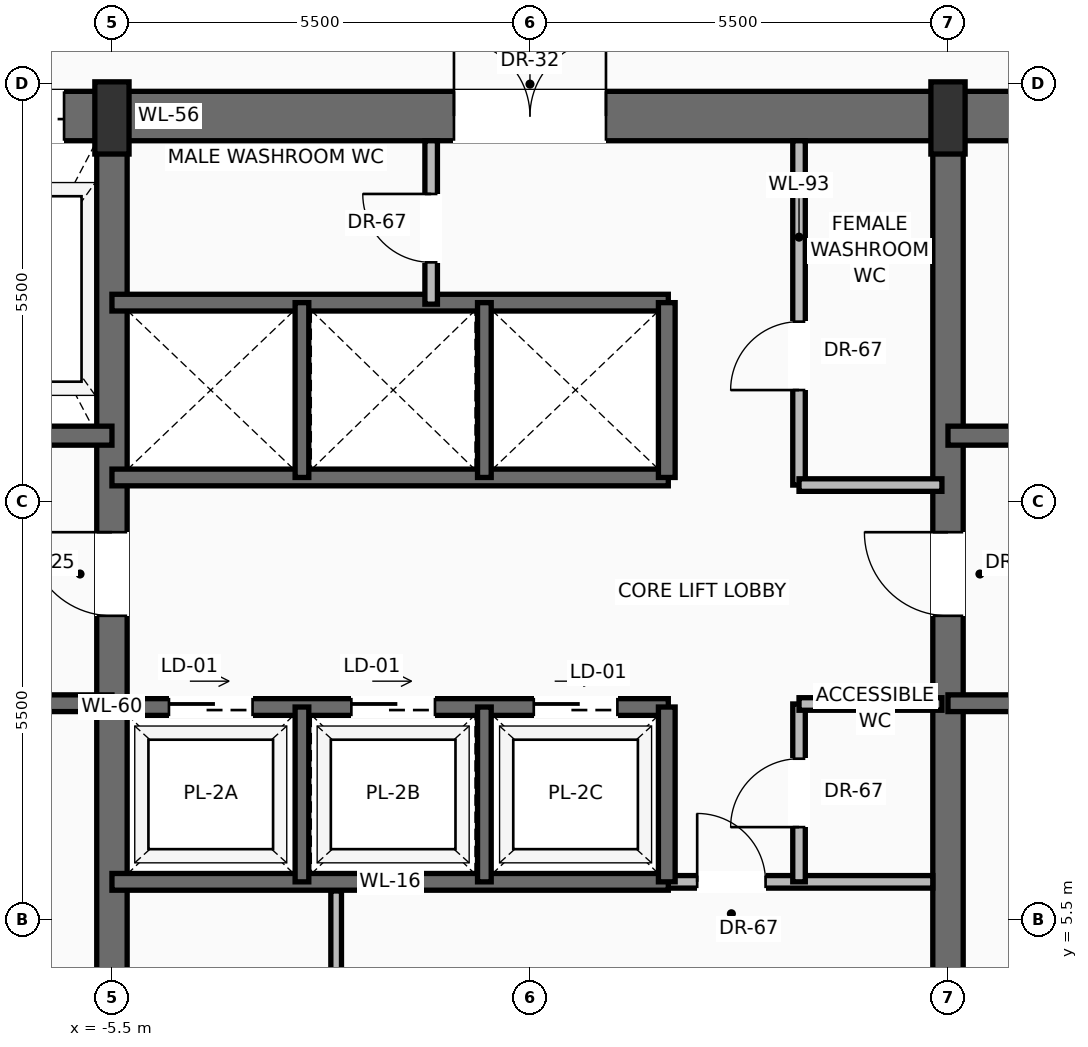
"""IFC4 building model, lengths in metres.
Left out: names, types, materials, properties, quantities, classifications, styles, units other than length and angle.
Written with IfcOpenShell. Run it as: python <this file> out.ifc"""

import sys

from ifc_helpers import new_model, si_unit, direction, frame, frame_2d, origin, origin_2d, place, context, subcontext, project, spatial, rectangle, extrude, source, transform, mapped, element, fill, save


model = new_model("IFC4")
c1 = context("Model", 3, precision=1e-05, world=origin(), true_north=direction((0.0, 1.0)))
c2 = subcontext(c1, "Body", "Model", "MODEL_VIEW")
j1 = project(units=[si_unit("LENGTHUNIT", "METRE"), si_unit("PLANEANGLEUNIT", "RADIAN")], contexts=[c1])
p1 = place(None, origin())
s1 = spatial("IfcSite", under=j1, at=p1, CompositionType="ELEMENT")
p2 = place(p1, origin())
s2 = spatial("IfcBuilding", under=s1, at=p2, CompositionType="ELEMENT")
p3 = place(p2, frame((0.0, 0.0, 174.7)))
s3 = spatial("IfcBuildingStorey", under=s2, at=p3, CompositionType="ELEMENT", Elevation=174.7)
p4 = place(p3, frame((-10.8, 16.075, 0.0), z_axis=(0.0, 0.0, 1.0), x_axis=(1.0, 0.0, 0.0)))
e1 = element("IfcWall", 1, at=p4, inside=s3, PredefinedType="SHEAR", context=c2, shape_type="SweptSolid", body=[
    extrude(rectangle(XDim=21.6, YDim=0.65, at=frame_2d((10.8, 0.0))), origin(), (0.0, 0.0, 1.0), 3.47),
])
p5 = place(p4, frame((3.37, 0.0, 0.0)))
e2 = element("IfcOpeningElement", 2, at=p5, cuts=e1, PredefinedType="OPENING", context=c2, shape_type="SweptSolid", body=[
    extrude(rectangle(XDim=1.3, YDim=2.3, at=frame_2d((0.65, 1.15))), frame((0.0, 0.335, 0.0), z_axis=(0.0, -1.0, 0.0), x_axis=(1.0, 0.0, 0.0)), (0.0, 0.0, 1.0), 0.67),
])
p6 = place(p4, frame((9.8, 0.0, 0.0)))
e3 = element("IfcOpeningElement", 3, at=p6, cuts=e1, PredefinedType="OPENING", context=c2, shape_type="SweptSolid", body=[
    extrude(rectangle(XDim=2.0, YDim=2.4, at=frame_2d((1.0, 1.2))), frame((0.0, 0.335, 0.0), z_axis=(0.0, -1.0, 0.0), x_axis=(1.0, 0.0, 0.0)), (0.0, 0.0, 1.0), 0.67),
])
p7 = place(p3, frame((-5.5, 0.525, 0.0), z_axis=(0.0, 0.0, 1.0), x_axis=(0.0, 1.0, 0.0)))
e4 = element("IfcWall", 4, at=p7, inside=s3, PredefinedType="SHEAR", context=c2, shape_type="SweptSolid", body=[
    extrude(rectangle(XDim=15.55, YDim=0.4, at=frame_2d((7.775, 0.0))), origin(), (0.0, 0.0, 1.0), 3.47),
])
p8 = place(p7, frame((8.975, 0.0, 0.0)))
e5 = element("IfcOpeningElement", 5, at=p8, cuts=e4, PredefinedType="OPENING", context=c2, shape_type="SweptSolid", body=[
    extrude(rectangle(XDim=1.1, YDim=2.2, at=frame_2d((0.55, 1.1))), frame((0.0, 0.21, 0.0), z_axis=(0.0, -1.0, 0.0), x_axis=(1.0, 0.0, 0.0)), (0.0, 0.0, 1.0), 0.42),
])
p9 = place(p3, frame((5.5, 0.525, 0.0), z_axis=(0.0, 0.0, 1.0), x_axis=(0.0, 1.0, 0.0)))
e6 = element("IfcWall", 6, at=p9, inside=s3, PredefinedType="SHEAR", context=c2, shape_type="SweptSolid", body=[
    extrude(rectangle(XDim=15.55, YDim=0.4, at=frame_2d((7.775, 0.0))), origin(), (0.0, 0.0, 1.0), 3.47),
])
p10 = place(p9, frame((8.975, 0.0, 0.0)))
e7 = element("IfcOpeningElement", 7, at=p10, cuts=e6, PredefinedType="OPENING", context=c2, shape_type="SweptSolid", body=[
    extrude(rectangle(XDim=1.1, YDim=2.2, at=frame_2d((0.55, 1.1))), frame((0.0, 0.21, 0.0), z_axis=(0.0, -1.0, 0.0), x_axis=(1.0, 0.0, 0.0)), (0.0, 0.0, 1.0), 0.42),
])
m1 = source(origin(), c2, "Body", "SweptSolid", [
    extrude(rectangle(XDim=0.45, YDim=0.95, at=origin_2d()), origin(), (0.0, 0.0, 1.0), 3.7),
])
for number, where, z_axis, x_axis in (
    (8, (-5.5, 16.05, 0.0), (0.0, 0.0, 1.0), (1.0, 0.0, 0.0)),
    (9, (5.5, 16.05, 0.0), (0.0, 0.0, 1.0), (1.0, 0.0, 0.0)),
):
    element("IfcColumn", number, at=place(p3, frame(where, z_axis=z_axis, x_axis=x_axis)), inside=s3, PredefinedType="PILASTER", context=c2, shape_type="MappedRepresentation", body=[
        mapped(m1, transform((0.0, 0.0, 0.0), scale=1.0)),
    ])
p11 = place(p3, frame((-5.5, 8.35, 0.0), z_axis=(0.0, 0.0, 1.0), x_axis=(-1.0, 0.0, 0.0)))
e10 = element("IfcWall", 10, at=p11, inside=s3, PredefinedType="SOLIDWALL", context=c2, shape_type="SweptSolid", body=[
    extrude(rectangle(XDim=4.65, YDim=0.22, at=frame_2d((2.325, 0.0))), origin(), (0.0, 0.0, 1.0), 3.47),
])
p12 = place(p11, frame((2.5, 0.0, 0.0)))
e11 = element("IfcOpeningElement", 11, at=p12, cuts=e10, PredefinedType="OPENING", context=c2, shape_type="SweptSolid", body=[
    extrude(rectangle(XDim=1.15, YDim=2.2, at=frame_2d((0.575, 1.1))), frame((0.0, 0.12, 0.0), z_axis=(0.0, -1.0, 0.0), x_axis=(1.0, 0.0, 0.0)), (0.0, 0.0, 1.0), 0.24),
])
p13 = place(p3, frame((-5.5, 11.87, 0.0), z_axis=(0.0, 0.0, 1.0), x_axis=(-1.0, 0.0, 0.0)))
e12 = element("IfcWall", 12, at=p13, inside=s3, PredefinedType="SOLIDWALL", context=c2, shape_type="SweptSolid", body=[
    extrude(rectangle(XDim=4.65, YDim=0.25, at=frame_2d((2.325, 0.0))), origin(), (0.0, 0.0, 1.0), 3.47),
])
p14 = place(p13, frame((2.95, 0.0, 0.0)))
e13 = element("IfcOpeningElement", 13, at=p14, cuts=e12, PredefinedType="OPENING", context=c2, shape_type="SweptSolid", body=[
    extrude(rectangle(XDim=1.2, YDim=2.25, at=frame_2d((0.6, 1.125))), frame((0.0, 0.135, 0.0), z_axis=(0.0, -1.0, 0.0), x_axis=(1.0, 0.0, 0.0)), (0.0, 0.0, 1.0), 0.27),
])
p15 = place(p3, frame((10.15, 8.35, 0.0), z_axis=(0.0, 0.0, 1.0), x_axis=(-1.0, 0.0, 0.0)))
e14 = element("IfcWall", 14, at=p15, inside=s3, PredefinedType="SOLIDWALL", context=c2, shape_type="SweptSolid", body=[
    extrude(rectangle(XDim=4.65, YDim=0.22, at=frame_2d((2.325, 0.0))), origin(), (0.0, 0.0, 1.0), 3.47),
])
p16 = place(p15, frame((1.0, 0.0, 0.0)))
e15 = element("IfcOpeningElement", 15, at=p16, cuts=e14, PredefinedType="OPENING", context=c2, shape_type="SweptSolid", body=[
    extrude(rectangle(XDim=1.15, YDim=2.2, at=frame_2d((0.575, 1.1))), frame((0.0, 0.12, 0.0), z_axis=(0.0, -1.0, 0.0), x_axis=(1.0, 0.0, 0.0)), (0.0, 0.0, 1.0), 0.24),
])
p17 = place(p3, frame((10.15, 11.87, 0.0), z_axis=(0.0, 0.0, 1.0), x_axis=(-1.0, 0.0, 0.0)))
e16 = element("IfcWall", 16, at=p17, inside=s3, PredefinedType="SOLIDWALL", context=c2, shape_type="SweptSolid", body=[
    extrude(rectangle(XDim=4.65, YDim=0.25, at=frame_2d((2.325, 0.0))), origin(), (0.0, 0.0, 1.0), 3.47),
])
p18 = place(p17, frame((0.5, 0.0, 0.0)))
e17 = element("IfcOpeningElement", 17, at=p18, cuts=e16, PredefinedType="OPENING", context=c2, shape_type="SweptSolid", body=[
    extrude(rectangle(XDim=1.2, YDim=2.25, at=frame_2d((0.6, 1.125))), frame((0.0, 0.135, 0.0), z_axis=(0.0, -1.0, 0.0), x_axis=(1.0, 0.0, 0.0)), (0.0, 0.0, 1.0), 0.27),
])
p19 = place(p3, frame((1.82, 6.0, 0.0), z_axis=(0.0, 0.0, 1.0), x_axis=(1.0, 0.0, 0.0)))
e18 = element("IfcWall", 18, at=p19, inside=s3, PredefinedType="PARTITIONING", context=c2, shape_type="SweptSolid", body=[
    extrude(rectangle(XDim=3.48, YDim=0.165, at=frame_2d((1.74, 0.0))), origin(), (0.0, 0.0, 1.0), 3.462),
])
p20 = place(p19, frame((0.38, 0.0, 0.0)))
e19 = element("IfcOpeningElement", 19, at=p20, cuts=e18, PredefinedType="OPENING", context=c2, shape_type="SweptSolid", body=[
    extrude(rectangle(XDim=0.9, YDim=2.1, at=frame_2d((0.45, 1.05))), frame((0.0, 0.093, 0.0), z_axis=(0.0, -1.0, 0.0), x_axis=(1.0, 0.0, 0.0)), (0.0, 0.0, 1.0), 0.185),
])
p21 = place(p3, frame((-2.55, 0.85, 0.0), z_axis=(0.0, 0.0, 1.0), x_axis=(0.0, 1.0, 0.0)))
e20 = element("IfcWall", 20, at=p21, inside=s3, PredefinedType="PARTITIONING", context=c2, shape_type="SweptSolid", body=[
    extrude(rectangle(XDim=5.03, YDim=0.14, at=frame_2d((2.515, 0.0))), origin(), (0.0, 0.0, 1.0), 3.462),
])
p22 = place(p21, frame((2.1, 0.0, 0.0)))
e21 = element("IfcOpeningElement", 21, at=p22, cuts=e20, PredefinedType="OPENING", context=c2, shape_type="SweptSolid", body=[
    extrude(rectangle(XDim=0.9, YDim=2.1, at=frame_2d((0.45, 1.05))), frame((0.0, 0.08, 0.0), z_axis=(0.0, -1.0, 0.0), x_axis=(1.0, 0.0, 0.0)), (0.0, 0.0, 1.0), 0.16),
])
p23 = place(p3, frame((3.54, 6.0, 0.0), z_axis=(0.0, 0.0, 1.0), x_axis=(0.0, 1.0, 0.0)))
e22 = element("IfcWall", 22, at=p23, inside=s3, PredefinedType="PARTITIONING", context=c2, shape_type="SweptSolid", body=[
    extrude(rectangle(XDim=2.34, YDim=0.165, at=frame_2d((1.17, 0.0))), origin(), (0.0, 0.0, 1.0), 3.462),
])
p24 = place(p23, frame((0.72, 0.0, 0.0)))
e23 = element("IfcOpeningElement", 23, at=p24, cuts=e22, PredefinedType="OPENING", context=c2, shape_type="SweptSolid", body=[
    extrude(rectangle(XDim=0.9, YDim=2.1, at=frame_2d((0.45, 1.05))), frame((0.0, 0.093, 0.0), z_axis=(0.0, -1.0, 0.0), x_axis=(1.0, 0.0, 0.0)), (0.0, 0.0, 1.0), 0.185),
])
p25 = place(p3, frame((3.54, 8.34, 0.0), z_axis=(0.0, 0.0, 1.0), x_axis=(1.0, 0.0, 0.0)))
e24 = element("IfcWall", 24, at=p25, inside=s3, PredefinedType="PARTITIONING", context=c2, shape_type="SweptSolid", body=[
    extrude(rectangle(XDim=1.88, YDim=0.165, at=frame_2d((0.94, 0.0))), origin(), (0.0, 0.0, 1.0), 3.462),
])
p26 = place(p3, frame((-5.5, 6.0, 0.0), z_axis=(0.0, 0.0, 1.0), x_axis=(1.0, 0.0, 0.0)))
e25 = element("IfcWall", 25, at=p26, inside=s3, PredefinedType="SOLIDWALL", context=c2, shape_type="SweptSolid", body=[
    extrude(rectangle(XDim=7.32, YDim=0.22, at=frame_2d((3.66, 0.0))), origin(), (0.0, 0.0, 1.0), 3.47),
])
p27 = place(p3, frame((-5.5, 8.3, 0.0), z_axis=(0.0, 0.0, 1.0), x_axis=(1.0, 0.0, 0.0)))
e26 = element("IfcWall", 26, at=p27, inside=s3, PredefinedType="SOLIDWALL", context=c2, shape_type="SweptSolid", body=[
    extrude(rectangle(XDim=7.32, YDim=0.22, at=frame_2d((3.66, 0.0))), origin(), (0.0, 0.0, 1.0), 3.47),
])
p28 = place(p27, frame((0.75, 0.0, 0.0)))
e27 = element("IfcOpeningElement", 27, at=p28, cuts=e26, PredefinedType="OPENING", context=c2, shape_type="SweptSolid", body=[
    extrude(rectangle(XDim=1.1, YDim=2.2, at=frame_2d((0.55, 1.1))), frame((0.0, 0.12, 0.0), z_axis=(0.0, -1.0, 0.0), x_axis=(1.0, 0.0, 0.0)), (0.0, 0.0, 1.0), 0.24),
])
p29 = place(p27, frame((3.15, 0.0, 0.0)))
e28 = element("IfcOpeningElement", 28, at=p29, cuts=e26, PredefinedType="OPENING", context=c2, shape_type="SweptSolid", body=[
    extrude(rectangle(XDim=1.1, YDim=2.2, at=frame_2d((0.55, 1.1))), frame((0.0, 0.12, 0.0), z_axis=(0.0, -1.0, 0.0), x_axis=(1.0, 0.0, 0.0)), (0.0, 0.0, 1.0), 0.24),
])
p30 = place(p27, frame((5.55, 0.0, 0.0)))
e29 = element("IfcOpeningElement", 29, at=p30, cuts=e26, PredefinedType="OPENING", context=c2, shape_type="SweptSolid", body=[
    extrude(rectangle(XDim=1.1, YDim=2.2, at=frame_2d((0.55, 1.1))), frame((0.0, 0.12, 0.0), z_axis=(0.0, -1.0, 0.0), x_axis=(1.0, 0.0, 0.0)), (0.0, 0.0, 1.0), 0.24),
])
p31 = place(p3, frame((1.8, 6.0, 0.0), z_axis=(0.0, 0.0, 1.0), x_axis=(0.0, 1.0, 0.0)))
e30 = element("IfcWall", 30, at=p31, inside=s3, PredefinedType="SOLIDWALL", context=c2, shape_type="SweptSolid", body=[
    extrude(rectangle(XDim=2.3, YDim=0.22, at=frame_2d((1.15, 0.0))), origin(), (0.0, 0.0, 1.0), 3.47),
])
for number, where, z_axis, x_axis in (
    (31, (-3.0, 6.0, 0.0), (0.0, 0.0, 1.0), (0.0, 1.0, 0.0)),
    (32, (-0.6, 6.0, 0.0), (0.0, 0.0, 1.0), (0.0, 1.0, 0.0)),
):
    element("IfcWall", number, at=place(p3, frame(where, z_axis=z_axis, x_axis=x_axis)), inside=s3, PredefinedType="SOLIDWALL", context=c2, shape_type="SweptSolid", body=[
        extrude(rectangle(XDim=2.3, YDim=0.18, at=frame_2d((1.15, 0.0))), origin(), (0.0, 0.0, 1.0), 3.47),
    ])
for number, where, z_axis, x_axis in (
    (33, (-5.5, 11.32, 0.0), (0.0, 0.0, 1.0), (1.0, 0.0, 0.0)),
    (34, (-5.5, 13.62, 0.0), (0.0, 0.0, 1.0), (1.0, 0.0, 0.0)),
):
    element("IfcWall", number, at=place(p3, frame(where, z_axis=z_axis, x_axis=x_axis)), inside=s3, PredefinedType="SOLIDWALL", context=c2, shape_type="SweptSolid", body=[
        extrude(rectangle(XDim=7.32, YDim=0.22, at=frame_2d((3.66, 0.0))), origin(), (0.0, 0.0, 1.0), 3.47),
    ])
p32 = place(p3, frame((1.8, 11.32, 0.0), z_axis=(0.0, 0.0, 1.0), x_axis=(0.0, 1.0, 0.0)))
e35 = element("IfcWall", 35, at=p32, inside=s3, PredefinedType="SOLIDWALL", context=c2, shape_type="SweptSolid", body=[
    extrude(rectangle(XDim=2.3, YDim=0.22, at=frame_2d((1.15, 0.0))), origin(), (0.0, 0.0, 1.0), 3.47),
])
for number, where, z_axis, x_axis in (
    (36, (-3.0, 11.32, 0.0), (0.0, 0.0, 1.0), (0.0, 1.0, 0.0)),
    (37, (-0.6, 11.32, 0.0), (0.0, 0.0, 1.0), (0.0, 1.0, 0.0)),
):
    element("IfcWall", number, at=place(p3, frame(where, z_axis=z_axis, x_axis=x_axis)), inside=s3, PredefinedType="SOLIDWALL", context=c2, shape_type="SweptSolid", body=[
        extrude(rectangle(XDim=2.3, YDim=0.18, at=frame_2d((1.15, 0.0))), origin(), (0.0, 0.0, 1.0), 3.47),
    ])
p33 = place(p3, frame((-1.3, 13.6, 0.0), z_axis=(0.0, 0.0, 1.0), x_axis=(0.0, 1.0, 0.0)))
e38 = element("IfcWall", 38, at=p33, inside=s3, PredefinedType="PARTITIONING", context=c2, shape_type="SweptSolid", body=[
    extrude(rectangle(XDim=2.15, YDim=0.165, at=frame_2d((1.075, 0.0))), origin(), (0.0, 0.0, 1.0), 3.462),
])
p34 = place(p33, frame((0.55, 0.0, 0.0)))
e39 = element("IfcOpeningElement", 39, at=p34, cuts=e38, PredefinedType="OPENING", context=c2, shape_type="SweptSolid", body=[
    extrude(rectangle(XDim=0.9, YDim=2.1, at=frame_2d((0.45, 1.05))), frame((0.0, 0.093, 0.0), z_axis=(0.0, -1.0, 0.0), x_axis=(1.0, 0.0, 0.0)), (0.0, 0.0, 1.0), 0.185),
])
p35 = place(p3, frame((3.54, 11.22, 0.0), z_axis=(0.0, 0.0, 1.0), x_axis=(0.0, 1.0, 0.0)))
e40 = element("IfcWall", 40, at=p35, inside=s3, PredefinedType="PARTITIONING", context=c2, shape_type="SweptSolid", body=[
    extrude(rectangle(XDim=4.53, YDim=0.165, at=frame_2d((2.265, 0.0))), origin(), (0.0, 0.0, 1.0), 3.462),
])
p36 = place(p35, frame((1.25, 0.0, 0.0)))
e41 = element("IfcOpeningElement", 41, at=p36, cuts=e40, PredefinedType="OPENING", context=c2, shape_type="SweptSolid", body=[
    extrude(rectangle(XDim=0.9, YDim=2.1, at=frame_2d((0.45, 1.05))), frame((0.0, 0.093, 0.0), z_axis=(0.0, -1.0, 0.0), x_axis=(1.0, 0.0, 0.0)), (0.0, 0.0, 1.0), 0.185),
])
p37 = place(p3, frame((3.54, 11.22, 0.0), z_axis=(0.0, 0.0, 1.0), x_axis=(1.0, 0.0, 0.0)))
e42 = element("IfcWall", 42, at=p37, inside=s3, PredefinedType="PARTITIONING", context=c2, shape_type="SweptSolid", body=[
    extrude(rectangle(XDim=1.88, YDim=0.165, at=frame_2d((0.94, 0.0))), origin(), (0.0, 0.0, 1.0), 3.462),
])
m2 = source(origin(), c2, "Body", "SweptSolid", [
    extrude(rectangle(XDim=1.1, YDim=2.2, at=frame_2d((0.55, 1.1))), frame((0.0, 0.025, 0.0), z_axis=(0.0, -1.0, 0.0), x_axis=(1.0, 0.0, 0.0)), (0.0, 0.0, 1.0), 0.05),
])
p38 = place(p8, origin())
e43 = element("IfcDoor", 43, at=p38, inside=s3, OperationType="SINGLE_SWING_RIGHT", PredefinedType="DOOR", context=c2, shape_type="MappedRepresentation", body=[
    mapped(m2, transform((0.0, 0.0, 0.0), scale=1.0)),
])
fill(e5, e43)
m3 = source(origin(), c2, "Body", "SweptSolid", [
    extrude(rectangle(XDim=1.3, YDim=2.3, at=frame_2d((0.65, 1.15))), frame((0.0, 0.025, 0.0), z_axis=(0.0, -1.0, 0.0), x_axis=(1.0, 0.0, 0.0)), (0.0, 0.0, 1.0), 0.05),
])
p39 = place(p5, origin())
e44 = element("IfcDoor", 44, at=p39, inside=s3, OperationType="SLIDING_TO_RIGHT", PredefinedType="DOOR", context=c2, shape_type="MappedRepresentation", body=[
    mapped(m3, transform((0.0, 0.0, 0.0), scale=1.0)),
])
fill(e2, e44)
p40 = place(p10, origin())
e45 = element("IfcDoor", 45, at=p40, inside=s3, OperationType="SINGLE_SWING_RIGHT", PredefinedType="DOOR", context=c2, shape_type="MappedRepresentation", body=[
    mapped(m2, transform((0.0, 0.0, 0.0), scale=1.0)),
])
fill(e7, e45)
m4 = source(origin(), c2, "Body", "SweptSolid", [
    extrude(rectangle(XDim=2.0, YDim=2.4, at=frame_2d((1.0, 1.2))), frame((0.0, 0.025, 0.0), z_axis=(0.0, -1.0, 0.0), x_axis=(1.0, 0.0, 0.0)), (0.0, 0.0, 1.0), 0.05),
])
p41 = place(p6, origin())
e46 = element("IfcDoor", 46, at=p41, inside=s3, OperationType="DOUBLE_DOOR_SINGLE_SWING", PredefinedType="DOOR", context=c2, shape_type="MappedRepresentation", body=[
    mapped(m4, transform((0.0, 0.0, 0.0), scale=1.0)),
])
fill(e3, e46)
m5 = source(origin(), c2, "Body", "SweptSolid", [
    extrude(rectangle(XDim=0.9, YDim=2.1, at=frame_2d((0.45, 1.05))), frame((0.0, 0.025, 0.0), z_axis=(0.0, -1.0, 0.0), x_axis=(1.0, 0.0, 0.0)), (0.0, 0.0, 1.0), 0.05),
])
p42 = place(p20, origin())
e47 = element("IfcDoor", 47, at=p42, inside=s3, OperationType="SINGLE_SWING_LEFT", PredefinedType="DOOR", context=c2, shape_type="MappedRepresentation", body=[
    mapped(m5, transform((0.0, 0.0, 0.0), scale=1.0)),
])
fill(e19, e47)
p43 = place(p24, origin())
e48 = element("IfcDoor", 48, at=p43, inside=s3, OperationType="SINGLE_SWING_LEFT", PredefinedType="DOOR", context=c2, shape_type="MappedRepresentation", body=[
    mapped(m5, transform((0.0, 0.0, 0.0), scale=1.0)),
])
fill(e23, e48)
m6 = source(origin(), c2, "Body", "SweptSolid", [
    extrude(rectangle(XDim=1.1, YDim=2.2, at=frame_2d((0.55, 1.1))), frame((0.0, 0.025, 0.0), z_axis=(0.0, -1.0, 0.0), x_axis=(1.0, 0.0, 0.0)), (0.0, 0.0, 1.0), 0.05),
])
p44 = place(p28, origin())
e49 = element("IfcDoor", 49, at=p44, inside=s3, OperationType="SLIDING_TO_LEFT", PredefinedType="DOOR", context=c2, shape_type="MappedRepresentation", body=[
    mapped(m6, transform((0.0, 0.0, 0.0), scale=1.0)),
])
fill(e27, e49)
p45 = place(p29, origin())
e50 = element("IfcDoor", 50, at=p45, inside=s3, OperationType="SLIDING_TO_LEFT", PredefinedType="DOOR", context=c2, shape_type="MappedRepresentation", body=[
    mapped(m6, transform((0.0, 0.0, 0.0), scale=1.0)),
])
fill(e28, e50)
p46 = place(p30, origin())
e51 = element("IfcDoor", 51, at=p46, inside=s3, OperationType="SLIDING_TO_LEFT", PredefinedType="DOOR", context=c2, shape_type="MappedRepresentation", body=[
    mapped(m6, transform((0.0, 0.0, 0.0), scale=1.0)),
])
fill(e29, e51)
p47 = place(p34, origin())
e52 = element("IfcDoor", 52, at=p47, inside=s3, OperationType="SINGLE_SWING_RIGHT", PredefinedType="DOOR", context=c2, shape_type="MappedRepresentation", body=[
    mapped(m5, transform((0.0, 0.0, 0.0), scale=1.0)),
])
fill(e39, e52)
p48 = place(p36, origin())
e53 = element("IfcDoor", 53, at=p48, inside=s3, OperationType="SINGLE_SWING_LEFT", PredefinedType="DOOR", context=c2, shape_type="MappedRepresentation", body=[
    mapped(m5, transform((0.0, 0.0, 0.0), scale=1.0)),
])
fill(e41, e53)
save(model, sys.argv[1])
